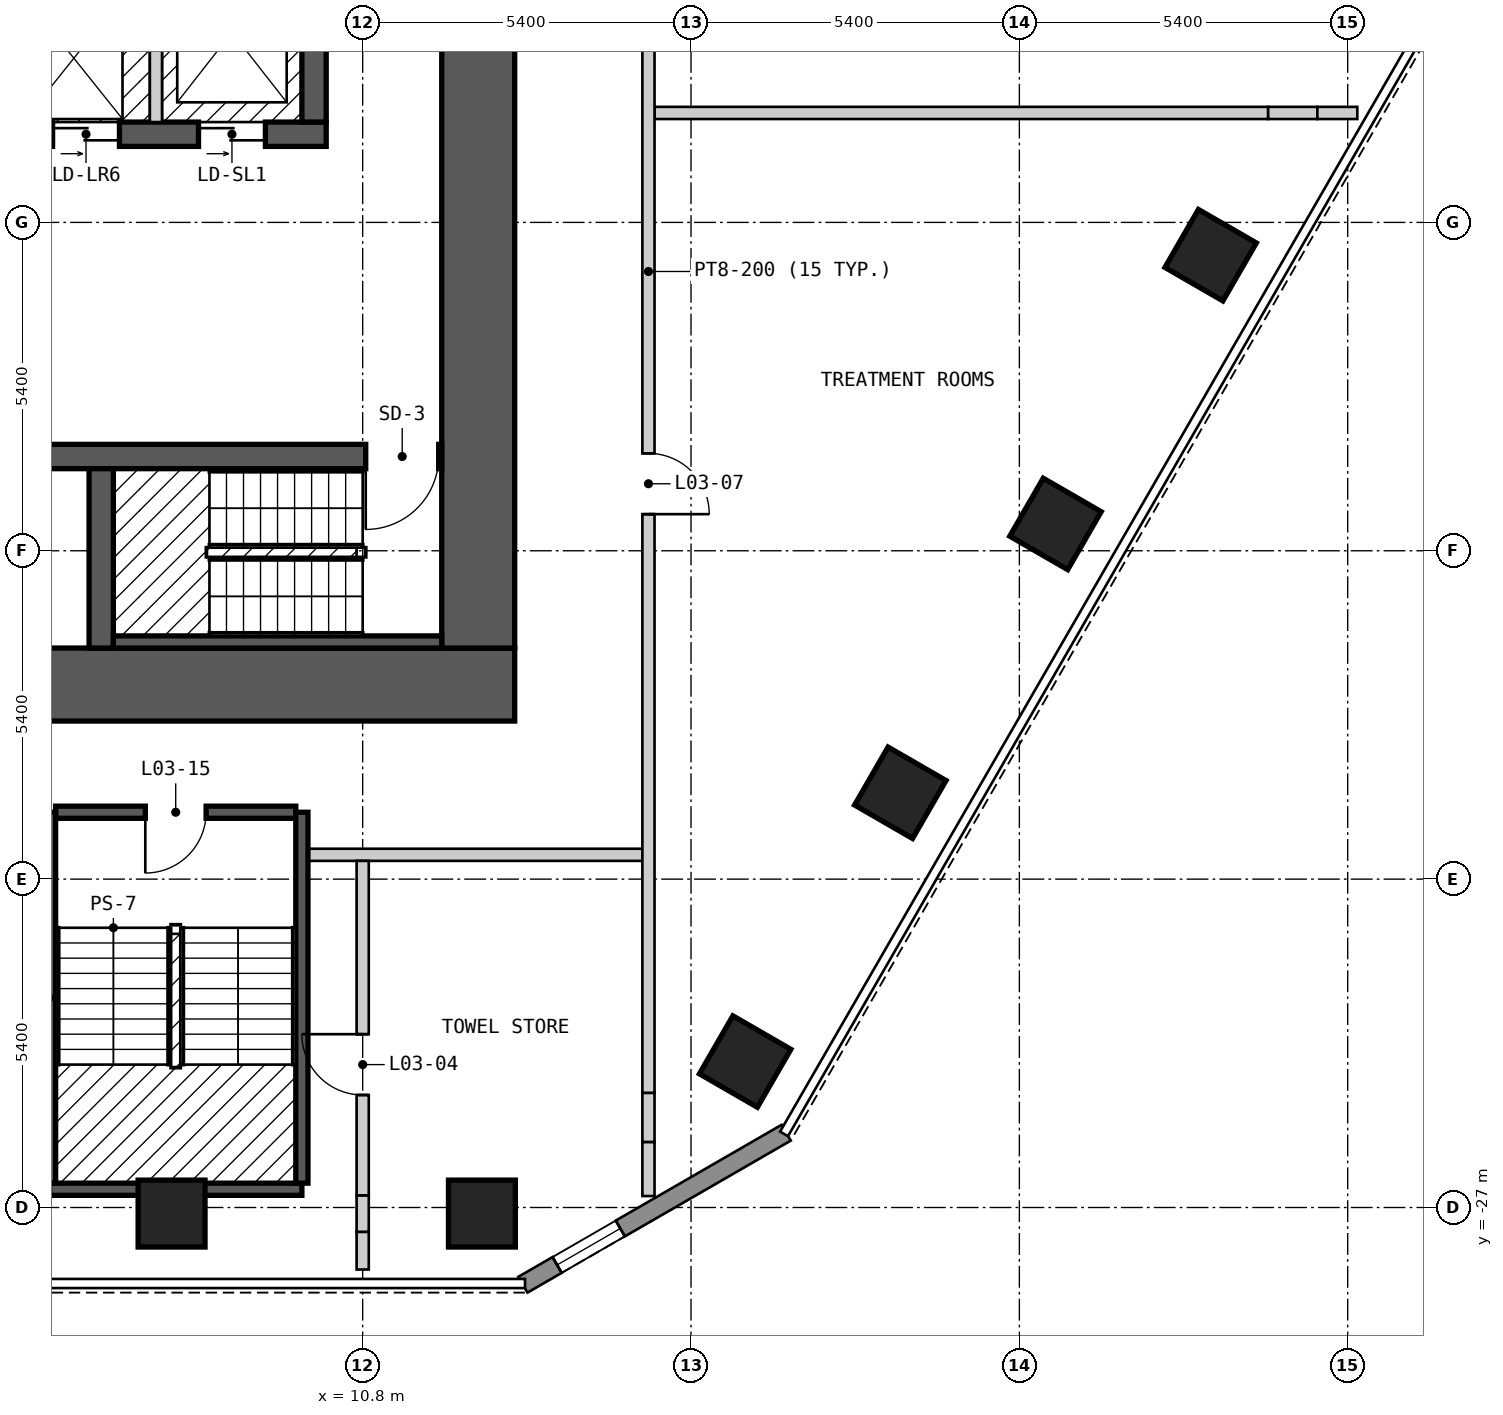
"""IFC4 building model, lengths in metres.
Left out: names, types, materials, properties, quantities, classifications, styles, units other than length and angle.
Written with IfcOpenShell. Run it as: python <this file> out.ifc"""

import sys

from ifc_helpers import new_model, si_unit, direction, frame, frame_2d, origin, origin_2d, place, context, subcontext, project, spatial, polyline, rectangle, outline, extrude, element, fill, save


model = new_model("IFC4")
c1 = context("Model", 3, precision=1e-05, world=origin(), true_north=direction((0.0, 1.0)))
c2 = subcontext(c1, "Body", "Model", "MODEL_VIEW")
j1 = project(units=[si_unit("LENGTHUNIT", "METRE"), si_unit("PLANEANGLEUNIT", "RADIAN")], contexts=[c1])
p1 = place(None, origin())
s1 = spatial("IfcSite", under=j1, at=p1, CompositionType="ELEMENT")
p2 = place(p1, origin())
s2 = spatial("IfcBuilding", under=s1, at=p2, CompositionType="ELEMENT")
p3 = place(p2, frame((0.0, 0.0, 12.6)))
s3 = spatial("IfcBuildingStorey", under=s2, at=p3, CompositionType="ELEMENT", Elevation=12.6)
for number, where, z_axis, x_axis in (
    (1, (7.657, -27.1, 0.0), (0.0, 0.0, 1.0), (1.0, 0.0, 0.0)),
    (2, (12.761, -27.1, 0.0), (0.0, 0.0, 1.0), (1.0, 0.0, 0.0)),
    (3, (17.09, -24.6, 0.0), (0.0, 0.0, 1.0), (0.5, 0.866, 0.0)),
    (4, (19.642, -20.18, 0.0), (0.0, 0.0, 1.0), (0.5, 0.866, 0.0)),
    (5, (22.194, -15.759, 0.0), (0.0, 0.0, 1.0), (0.5, 0.866, 0.0)),
    (6, (24.746, -11.339, 0.0), (0.0, 0.0, 1.0), (0.5, 0.866, 0.0)),
):
    element("IfcColumn", number, at=place(p3, frame(where, z_axis=z_axis, x_axis=x_axis)), inside=s3, PredefinedType="COLUMN", context=c2, shape_type="SweptSolid", body=[
        extrude(rectangle(XDim=1.1, YDim=1.1, at=origin_2d()), origin(), (0.0, 0.0, 1.0), 3.6),
    ])
p4 = place(p3, frame((-13.3, -18.4, 0.0), z_axis=(0.0, 0.0, 1.0), x_axis=(1.0, 0.0, 0.0)))
e7 = element("IfcWall", 7, at=p4, inside=s3, PredefinedType="SHEAR", context=c2, shape_type="SweptSolid", body=[
    extrude(rectangle(XDim=26.6, YDim=1.2, at=frame_2d((13.3, 0.0))), origin(), (0.0, 0.0, 1.0), 3.25),
])
p5 = place(p3, frame((12.7, -17.8, 0.0), z_axis=(0.0, 0.0, 1.0), x_axis=(0.0, 1.0, 0.0)))
e8 = element("IfcWall", 8, at=p5, inside=s3, PredefinedType="SHEAR", context=c2, shape_type="SweptSolid", body=[
    extrude(rectangle(XDim=11.6, YDim=1.2, at=frame_2d((5.8, 0.0))), origin(), (0.0, 0.0, 1.0), 3.25),
])
p6 = place(p3, frame((-12.1, -14.65, 0.0), z_axis=(0.0, 0.0, 1.0), x_axis=(1.0, 0.0, 0.0)))
e9 = element("IfcWall", 9, at=p6, inside=s3, PredefinedType="SHEAR", context=c2, shape_type="SweptSolid", body=[
    extrude(rectangle(XDim=24.2, YDim=0.4, at=frame_2d((12.1, 0.0))), origin(), (0.0, 0.0, 1.0), 3.25),
])
p7 = place(p6, frame((1.3, 0.0, 0.0), z_axis=(0.0, 0.0, 1.0), x_axis=(-1.0, 0.0, 0.0)))
e10 = element("IfcOpeningElement", 10, at=p7, cuts=e9, PredefinedType="OPENING", context=c2, shape_type="SweptSolid", body=[
    extrude(rectangle(XDim=1.2, YDim=2.1, at=frame_2d((0.6, 1.05))), frame((0.0, 0.21, 0.0), z_axis=(0.0, -1.0, 0.0), x_axis=(1.0, 0.0, 0.0)), (0.0, 0.0, 1.0), 0.42),
])
p8 = place(p6, frame((24.15, 0.0, 0.0), z_axis=(0.0, 0.0, 1.0), x_axis=(-1.0, 0.0, 0.0)))
e11 = element("IfcOpeningElement", 11, at=p8, cuts=e9, PredefinedType="OPENING", context=c2, shape_type="SweptSolid", body=[
    extrude(rectangle(XDim=1.2, YDim=2.1, at=frame_2d((0.6, 1.05))), frame((0.0, 0.21, 0.0), z_axis=(0.0, -1.0, 0.0), x_axis=(1.0, 0.0, 0.0)), (0.0, 0.0, 1.0), 0.42),
])
p9 = place(p6, frame((17.2, 0.0, 0.0), z_axis=(0.0, 0.0, 1.0), x_axis=(-1.0, 0.0, 0.0)))
e12 = element("IfcOpeningElement", 12, at=p9, cuts=e9, PredefinedType="OPENING", context=c2, shape_type="SweptSolid", body=[
    extrude(rectangle(XDim=1.0, YDim=2.1, at=frame_2d((0.5, 1.05))), frame((0.0, 0.21, 0.0), z_axis=(0.0, -1.0, 0.0), x_axis=(1.0, 0.0, 0.0)), (0.0, 0.0, 1.0), 0.42),
])
p10 = place(p3, frame((-12.1, -9.35, 0.0), z_axis=(0.0, 0.0, 1.0), x_axis=(1.0, 0.0, 0.0)))
e13 = element("IfcWall", 13, at=p10, inside=s3, PredefinedType="SHEAR", context=c2, shape_type="SweptSolid", body=[
    extrude(rectangle(XDim=22.3, YDim=0.4, at=frame_2d((11.15, 0.0))), origin(), (0.0, 0.0, 1.0), 3.25),
])
p11 = place(p10, frame((0.7, 0.0, 0.0)))
e14 = element("IfcOpeningElement", 14, at=p11, cuts=e13, PredefinedType="OPENING", context=c2, shape_type="SweptSolid", body=[
    extrude(rectangle(XDim=1.1, YDim=2.1, at=frame_2d((0.55, 1.05))), frame((0.0, 0.21, 0.0), z_axis=(0.0, -1.0, 0.0), x_axis=(1.0, 0.0, 0.0)), (0.0, 0.0, 1.0), 0.42),
])
p12 = place(p10, frame((3.5, 0.0, 0.0)))
e15 = element("IfcOpeningElement", 15, at=p12, cuts=e13, PredefinedType="OPENING", context=c2, shape_type="SweptSolid", body=[
    extrude(rectangle(XDim=1.1, YDim=2.1, at=frame_2d((0.55, 1.05))), frame((0.0, 0.21, 0.0), z_axis=(0.0, -1.0, 0.0), x_axis=(1.0, 0.0, 0.0)), (0.0, 0.0, 1.0), 0.42),
])
p13 = place(p10, frame((6.3, 0.0, 0.0)))
e16 = element("IfcOpeningElement", 16, at=p13, cuts=e13, PredefinedType="OPENING", context=c2, shape_type="SweptSolid", body=[
    extrude(rectangle(XDim=1.1, YDim=2.1, at=frame_2d((0.55, 1.05))), frame((0.0, 0.21, 0.0), z_axis=(0.0, -1.0, 0.0), x_axis=(1.0, 0.0, 0.0)), (0.0, 0.0, 1.0), 0.42),
])
p14 = place(p10, frame((8.6, 0.0, 0.0)))
e17 = element("IfcOpeningElement", 17, at=p14, cuts=e13, PredefinedType="OPENING", context=c2, shape_type="SweptSolid", body=[
    extrude(rectangle(XDim=1.1, YDim=2.1, at=frame_2d((0.55, 1.05))), frame((0.0, 0.21, 0.0), z_axis=(0.0, -1.0, 0.0), x_axis=(1.0, 0.0, 0.0)), (0.0, 0.0, 1.0), 0.42),
])
p15 = place(p10, frame((10.9, 0.0, 0.0)))
e18 = element("IfcOpeningElement", 18, at=p15, cuts=e13, PredefinedType="OPENING", context=c2, shape_type="SweptSolid", body=[
    extrude(rectangle(XDim=1.1, YDim=2.1, at=frame_2d((0.55, 1.05))), frame((0.0, 0.21, 0.0), z_axis=(0.0, -1.0, 0.0), x_axis=(1.0, 0.0, 0.0)), (0.0, 0.0, 1.0), 0.42),
])
p16 = place(p10, frame((13.2, 0.0, 0.0)))
e19 = element("IfcOpeningElement", 19, at=p16, cuts=e13, PredefinedType="OPENING", context=c2, shape_type="SweptSolid", body=[
    extrude(rectangle(XDim=1.1, YDim=2.1, at=frame_2d((0.55, 1.05))), frame((0.0, 0.21, 0.0), z_axis=(0.0, -1.0, 0.0), x_axis=(1.0, 0.0, 0.0)), (0.0, 0.0, 1.0), 0.42),
])
p17 = place(p10, frame((15.5, 0.0, 0.0)))
e20 = element("IfcOpeningElement", 20, at=p17, cuts=e13, PredefinedType="OPENING", context=c2, shape_type="SweptSolid", body=[
    extrude(rectangle(XDim=1.1, YDim=2.1, at=frame_2d((0.55, 1.05))), frame((0.0, 0.21, 0.0), z_axis=(0.0, -1.0, 0.0), x_axis=(1.0, 0.0, 0.0)), (0.0, 0.0, 1.0), 0.42),
])
p18 = place(p10, frame((17.8, 0.0, 0.0)))
e21 = element("IfcOpeningElement", 21, at=p18, cuts=e13, PredefinedType="OPENING", context=c2, shape_type="SweptSolid", body=[
    extrude(rectangle(XDim=1.1, YDim=2.1, at=frame_2d((0.55, 1.05))), frame((0.0, 0.21, 0.0), z_axis=(0.0, -1.0, 0.0), x_axis=(1.0, 0.0, 0.0)), (0.0, 0.0, 1.0), 0.42),
])
p19 = place(p10, frame((20.2, 0.0, 0.0)))
e22 = element("IfcOpeningElement", 22, at=p19, cuts=e13, PredefinedType="OPENING", context=c2, shape_type="SweptSolid", body=[
    extrude(rectangle(XDim=1.1, YDim=2.1, at=frame_2d((0.55, 1.05))), frame((0.0, 0.21, 0.0), z_axis=(0.0, -1.0, 0.0), x_axis=(1.0, 0.0, 0.0)), (0.0, 0.0, 1.0), 0.42),
])
for number, where, z_axis, x_axis in (
    (23, (6.5, -17.8, 0.0), (0.0, 0.0, 1.0), (0.0, 1.0, 0.0)),
    (24, (10.0, -9.15, 0.0), (0.0, 0.0, 1.0), (0.0, 1.0, 0.0)),
):
    element("IfcWall", number, at=place(p3, frame(where, z_axis=z_axis, x_axis=x_axis)), inside=s3, PredefinedType="SHEAR", context=c2, shape_type="SweptSolid", body=[
        extrude(rectangle(XDim=2.95, YDim=0.4, at=frame_2d((1.475, 0.0))), origin(), (0.0, 0.0, 1.0), 3.25),
    ])
p20 = place(p3, frame((13.435, -28.27, 0.0), z_axis=(0.0, 0.0, 1.0), x_axis=(0.866010750942, 0.50002537861, 0.0)))
e25 = element("IfcWall", 25, at=p20, inside=s3, PredefinedType="SOLIDWALL", context=c2, shape_type="SweptSolid", body=[
    extrude(outline(polyline([(0.0, -0.15), (5.0, -0.15), (4.919, 0.15), (0.08, 0.15), (0.0, -0.15)])), origin(), (0.0, 0.0, 1.0), 3.25),
])
p21 = place(p20, frame((0.65, 0.0, 0.15)))
e26 = element("IfcOpeningElement", 26, at=p21, cuts=e25, PredefinedType="OPENING", context=c2, shape_type="SweptSolid", body=[
    extrude(rectangle(XDim=1.2, YDim=2.1, at=frame_2d((0.6, 1.05))), frame((0.0, 0.16, 0.0), z_axis=(0.0, -1.0, 0.0), x_axis=(1.0, 0.0, 0.0)), (0.0, 0.0, 1.0), 0.32),
])
p22 = place(p3, frame((5.65, -26.7, 0.0), z_axis=(0.0, 0.0, 1.0), x_axis=(1.0, 0.0, 0.0)))
e27 = element("IfcWall", 27, at=p22, inside=s3, PredefinedType="SOLIDWALL", context=c2, shape_type="SweptSolid", body=[
    extrude(rectangle(XDim=4.15, YDim=0.2, at=frame_2d((2.075, 0.0))), origin(), (0.0, 0.0, 1.0), 3.25),
])
p23 = place(p3, frame((-18.35, -21.2, 0.0), z_axis=(0.0, 0.0, 1.0), x_axis=(1.0, 0.0, 0.0)))
e28 = element("IfcWall", 28, at=p23, inside=s3, PredefinedType="PARTITIONING", context=c2, shape_type="SweptSolid", body=[
    extrude(rectangle(XDim=24.1, YDim=0.2, at=frame_2d((12.05, 0.0))), origin(), (0.0, 0.0, 1.0), 3.25),
])
p24 = place(p23, frame((2.277, 0.0, 0.0), z_axis=(0.0, 0.0, 1.0), x_axis=(-1.0, 0.0, 0.0)))
e29 = element("IfcOpeningElement", 29, at=p24, cuts=e28, PredefinedType="OPENING", context=c2, shape_type="SweptSolid", body=[
    extrude(rectangle(XDim=0.9, YDim=2.1, at=frame_2d((0.45, 1.05))), frame((0.0, 0.11, 0.0), z_axis=(0.0, -1.0, 0.0), x_axis=(1.0, 0.0, 0.0)), (0.0, 0.0, 1.0), 0.22),
])
p25 = place(p23, frame((6.15, 0.0, 0.0), z_axis=(0.0, 0.0, 1.0), x_axis=(-1.0, 0.0, 0.0)))
e30 = element("IfcOpeningElement", 30, at=p25, cuts=e28, PredefinedType="OPENING", context=c2, shape_type="SweptSolid", body=[
    extrude(rectangle(XDim=1.0, YDim=2.1, at=frame_2d((0.5, 1.05))), frame((0.0, 0.11, 0.0), z_axis=(0.0, -1.0, 0.0), x_axis=(1.0, 0.0, 0.0)), (0.0, 0.0, 1.0), 0.22),
])
p26 = place(p23, frame((14.923, 0.0, 0.0)))
e31 = element("IfcOpeningElement", 31, at=p26, cuts=e28, PredefinedType="OPENING", context=c2, shape_type="SweptSolid", body=[
    extrude(rectangle(XDim=1.8, YDim=2.1, at=frame_2d((0.9, 1.05))), frame((0.0, 0.11, 0.0), z_axis=(0.0, -1.0, 0.0), x_axis=(1.0, 0.0, 0.0)), (0.0, 0.0, 1.0), 0.22),
])
p27 = place(p3, frame((9.7, -21.2, 0.0), z_axis=(0.0, 0.0, 1.0), x_axis=(1.0, 0.0, 0.0)))
e32 = element("IfcWall", 32, at=p27, inside=s3, PredefinedType="PARTITIONING", context=c2, shape_type="SweptSolid", body=[
    extrude(rectangle(XDim=5.7, YDim=0.2, at=frame_2d((2.85, 0.0))), origin(), (0.0, 0.0, 1.0), 3.25),
])
p28 = place(p3, frame((5.75, -20.5, 0.0), z_axis=(0.0, 0.0, 1.0), x_axis=(1.0, 0.0, 0.0)))
e33 = element("IfcWall", 33, at=p28, inside=s3, PredefinedType="SOLIDWALL", context=c2, shape_type="SweptSolid", body=[
    extrude(rectangle(XDim=3.95, YDim=0.2, at=frame_2d((1.975, 0.0))), origin(), (0.0, 0.0, 1.0), 3.25),
])
p29 = place(p28, frame((2.475, 0.0, 0.0), z_axis=(0.0, 0.0, 1.0), x_axis=(-1.0, 0.0, 0.0)))
e34 = element("IfcOpeningElement", 34, at=p29, cuts=e33, PredefinedType="OPENING", context=c2, shape_type="SweptSolid", body=[
    extrude(rectangle(XDim=1.0, YDim=2.1, at=frame_2d((0.5, 1.05))), frame((0.0, 0.11, 0.0), z_axis=(0.0, -1.0, 0.0), x_axis=(1.0, 0.0, 0.0)), (0.0, 0.0, 1.0), 0.22),
])
p30 = place(p3, frame((15.6, -9.0, 0.0), z_axis=(0.0, 0.0, 1.0), x_axis=(1.0, 0.0, 0.0)))
e35 = element("IfcWall", 35, at=p30, inside=s3, PredefinedType="PARTITIONING", context=c2, shape_type="SweptSolid", body=[
    extrude(rectangle(XDim=10.092, YDim=0.2, at=frame_2d((5.046, 0.0))), origin(), (0.0, 0.0, 1.0), 3.25),
])
p31 = place(p3, frame((25.692, -9.0, 0.0), z_axis=(0.0, 0.0, 1.0), x_axis=(1.0, 0.0, 0.0)))
e36 = element("IfcWall", 36, at=p31, inside=s3, PredefinedType="PARTITIONING", context=c2, shape_type="SweptSolid", body=[
    extrude(rectangle(XDim=0.809, YDim=0.2, at=frame_2d((0.405, 0.0))), origin(), (0.0, 0.0, 1.0), 2.52),
])
p32 = place(p3, frame((26.501, -9.0, 0.0), z_axis=(0.0, 0.0, 1.0), x_axis=(1.0, 0.0, 0.0)))
e37 = element("IfcWall", 37, at=p32, inside=s3, PredefinedType="PARTITIONING", context=c2, shape_type="SweptSolid", body=[
    extrude(rectangle(XDim=0.657, YDim=0.2, at=frame_2d((0.329, 0.0))), origin(), (0.0, 0.0, 1.0), 3.25),
])
for number, where, z_axis, x_axis in (
    (38, (5.65, -26.6, 0.0), (0.0, 0.0, 1.0), (0.0, 1.0, 0.0)),
    (39, (9.8, -26.6, 0.0), (0.0, 0.0, 1.0), (0.0, 1.0, 0.0)),
):
    element("IfcWall", number, at=place(p3, frame(where, z_axis=z_axis, x_axis=x_axis)), inside=s3, PredefinedType="SOLIDWALL", context=c2, shape_type="SweptSolid", body=[
        extrude(rectangle(XDim=6.1, YDim=0.2, at=frame_2d((3.05, 0.0))), origin(), (0.0, 0.0, 1.0), 3.25),
    ])
p33 = place(p3, frame((10.8, -28.02, 0.0), z_axis=(0.0, 0.0, 1.0), x_axis=(0.0, 1.0, 0.0)))
e40 = element("IfcWall", 40, at=p33, inside=s3, PredefinedType="PARTITIONING", context=c2, shape_type="SweptSolid", body=[
    extrude(rectangle(XDim=0.62, YDim=0.2, at=frame_2d((0.31, 0.0))), origin(), (0.0, 0.0, 1.0), 3.25),
])
p34 = place(p3, frame((10.8, -27.4, 0.0), z_axis=(0.0, 0.0, 1.0), x_axis=(0.0, 1.0, 0.0)))
e41 = element("IfcWall", 41, at=p34, inside=s3, PredefinedType="PARTITIONING", context=c2, shape_type="SweptSolid", body=[
    extrude(rectangle(XDim=0.6, YDim=0.2, at=frame_2d((0.3, 0.0))), origin(), (0.0, 0.0, 1.0), 2.52),
])
p35 = place(p3, frame((10.8, -26.8, 0.0), z_axis=(0.0, 0.0, 1.0), x_axis=(0.0, 1.0, 0.0)))
e42 = element("IfcWall", 42, at=p35, inside=s3, PredefinedType="PARTITIONING", context=c2, shape_type="SweptSolid", body=[
    extrude(rectangle(XDim=5.5, YDim=0.2, at=frame_2d((2.75, 0.0))), origin(), (0.0, 0.0, 1.0), 3.25),
])
p36 = place(p35, frame((2.65, 0.0, 0.0), z_axis=(0.0, 0.0, 1.0), x_axis=(-1.0, 0.0, 0.0)))
e43 = element("IfcOpeningElement", 43, at=p36, cuts=e42, PredefinedType="OPENING", context=c2, shape_type="SweptSolid", body=[
    extrude(rectangle(XDim=1.0, YDim=2.1, at=frame_2d((0.5, 1.05))), frame((0.0, 0.11, 0.0), z_axis=(0.0, -1.0, 0.0), x_axis=(1.0, 0.0, 0.0)), (0.0, 0.0, 1.0), 0.22),
])
p37 = place(p3, frame((15.5, -26.812, 0.0), z_axis=(0.0, 0.0, 1.0), x_axis=(0.0, 1.0, 0.0)))
e44 = element("IfcWall", 44, at=p37, inside=s3, PredefinedType="PARTITIONING", context=c2, shape_type="SweptSolid", body=[
    extrude(rectangle(XDim=0.89, YDim=0.2, at=frame_2d((0.445, 0.0))), origin(), (0.0, 0.0, 1.0), 3.25),
])
p38 = place(p3, frame((15.5, -25.922, 0.0), z_axis=(0.0, 0.0, 1.0), x_axis=(0.0, 1.0, 0.0)))
e45 = element("IfcWall", 45, at=p38, inside=s3, PredefinedType="PARTITIONING", context=c2, shape_type="SweptSolid", body=[
    extrude(rectangle(XDim=0.808, YDim=0.2, at=frame_2d((0.404, 0.0))), origin(), (0.0, 0.0, 1.0), 2.52),
])
p39 = place(p3, frame((15.5, -25.114, 0.0), z_axis=(0.0, 0.0, 1.0), x_axis=(0.0, 1.0, 0.0)))
e46 = element("IfcWall", 46, at=p39, inside=s3, PredefinedType="PARTITIONING", context=c2, shape_type="SweptSolid", body=[
    extrude(rectangle(XDim=27.014, YDim=0.2, at=frame_2d((13.507, 0.0))), origin(), (0.0, 0.0, 1.0), 3.25),
])
p40 = place(p39, frame((10.516, 0.0, 0.0), z_axis=(0.0, 0.0, 1.0), x_axis=(-1.0, 0.0, 0.0)))
e47 = element("IfcOpeningElement", 47, at=p40, cuts=e46, PredefinedType="OPENING", context=c2, shape_type="SweptSolid", body=[
    extrude(rectangle(XDim=1.0, YDim=2.1, at=frame_2d((0.5, 1.05))), frame((0.0, 0.11, 0.0), z_axis=(0.0, -1.0, 0.0), x_axis=(1.0, 0.0, 0.0)), (0.0, 0.0, 1.0), 0.22),
])
p41 = place(p39, frame((22.112, 0.0, 0.0), z_axis=(0.0, 0.0, 1.0), x_axis=(-1.0, 0.0, 0.0)))
e48 = element("IfcOpeningElement", 48, at=p41, cuts=e46, PredefinedType="OPENING", context=c2, shape_type="SweptSolid", body=[
    extrude(rectangle(XDim=1.0, YDim=2.1, at=frame_2d((0.5, 1.05))), frame((0.0, 0.11, 0.0), z_axis=(0.0, -1.0, 0.0), x_axis=(1.0, 0.0, 0.0)), (0.0, 0.0, 1.0), 0.22),
])
p42 = place(p3, frame((6.7, -17.7, 0.0), z_axis=(0.0, 0.0, 1.0), x_axis=(1.0, 0.0, 0.0)))
e49 = element("IfcWall", 49, at=p42, inside=s3, PredefinedType="SOLIDWALL", context=c2, shape_type="SweptSolid", body=[
    extrude(rectangle(XDim=5.4, YDim=0.2, at=frame_2d((2.7, 0.0))), origin(), (0.0, 0.0, 1.0), 3.25),
])
p43 = place(p3, frame((7.4, -9.15, 0.0), z_axis=(0.0, 0.0, 1.0), x_axis=(0.0, 1.0, 0.0)))
e50 = element("IfcWall", 50, at=p43, inside=s3, PredefinedType="SOLIDWALL", context=c2, shape_type="SweptSolid", body=[
    extrude(rectangle(XDim=2.95, YDim=0.2, at=frame_2d((1.475, 0.0))), origin(), (0.0, 0.0, 1.0), 3.25),
])
p44 = place(p21, origin())
e51 = element("IfcWindow", 51, at=p44, inside=s3, PartitioningType="SINGLE_PANEL", PredefinedType="WINDOW", context=c2, shape_type="SweptSolid", body=[
    extrude(rectangle(XDim=1.2, YDim=2.1, at=frame_2d((0.6, 1.05))), frame((0.0, 0.03, 0.0), z_axis=(0.0, -1.0, 0.0), x_axis=(1.0, 0.0, 0.0)), (0.0, 0.0, 1.0), 0.06),
])
fill(e26, e51)
p45 = place(p36, origin())
e52 = element("IfcDoor", 52, at=p45, inside=s3, OperationType="SINGLE_SWING_LEFT", PredefinedType="DOOR", context=c2, shape_type="SweptSolid", body=[
    extrude(rectangle(XDim=1.0, YDim=2.1, at=frame_2d((0.5, 1.05))), frame((0.0, 0.025, 0.0), z_axis=(0.0, -1.0, 0.0), x_axis=(1.0, 0.0, 0.0)), (0.0, 0.0, 1.0), 0.05),
])
fill(e43, e52)
p46 = place(p40, origin())
e53 = element("IfcDoor", 53, at=p46, inside=s3, OperationType="SINGLE_SWING_RIGHT", PredefinedType="DOOR", context=c2, shape_type="SweptSolid", body=[
    extrude(rectangle(XDim=1.0, YDim=2.1, at=frame_2d((0.5, 1.05))), frame((0.0, 0.025, 0.0), z_axis=(0.0, -1.0, 0.0), x_axis=(1.0, 0.0, 0.0)), (0.0, 0.0, 1.0), 0.05),
])
fill(e47, e53)
p47 = place(p29, origin())
e54 = element("IfcDoor", 54, at=p47, inside=s3, OperationType="SINGLE_SWING_RIGHT", PredefinedType="DOOR", context=c2, shape_type="SweptSolid", body=[
    extrude(rectangle(XDim=1.0, YDim=2.1, at=frame_2d((0.5, 1.05))), frame((0.0, 0.025, 0.0), z_axis=(0.0, -1.0, 0.0), x_axis=(1.0, 0.0, 0.0)), (0.0, 0.0, 1.0), 0.05),
])
fill(e34, e54)
p48 = place(p18, origin())
e55 = element("IfcDoor", 55, at=p48, inside=s3, OperationType="DOUBLE_DOOR_SLIDING", PredefinedType="DOOR", context=c2, shape_type="SweptSolid", body=[
    extrude(rectangle(XDim=1.1, YDim=2.1, at=frame_2d((0.55, 1.05))), frame((0.0, 0.025, 0.0), z_axis=(0.0, -1.0, 0.0), x_axis=(1.0, 0.0, 0.0)), (0.0, 0.0, 1.0), 0.05),
])
fill(e21, e55)
p49 = place(p19, origin())
e56 = element("IfcDoor", 56, at=p49, inside=s3, OperationType="DOUBLE_DOOR_SLIDING", PredefinedType="DOOR", context=c2, shape_type="SweptSolid", body=[
    extrude(rectangle(XDim=1.1, YDim=2.1, at=frame_2d((0.55, 1.05))), frame((0.0, 0.025, 0.0), z_axis=(0.0, -1.0, 0.0), x_axis=(1.0, 0.0, 0.0)), (0.0, 0.0, 1.0), 0.05),
])
fill(e22, e56)
p50 = place(p8, origin())
e57 = element("IfcDoor", 57, at=p50, inside=s3, OperationType="SINGLE_SWING_RIGHT", PredefinedType="DOOR", context=c2, shape_type="SweptSolid", body=[
    extrude(rectangle(XDim=1.2, YDim=2.1, at=frame_2d((0.6, 1.05))), frame((0.0, 0.025, 0.0), z_axis=(0.0, -1.0, 0.0), x_axis=(1.0, 0.0, 0.0)), (0.0, 0.0, 1.0), 0.05),
])
fill(e11, e57)
save(model, sys.argv[1])
